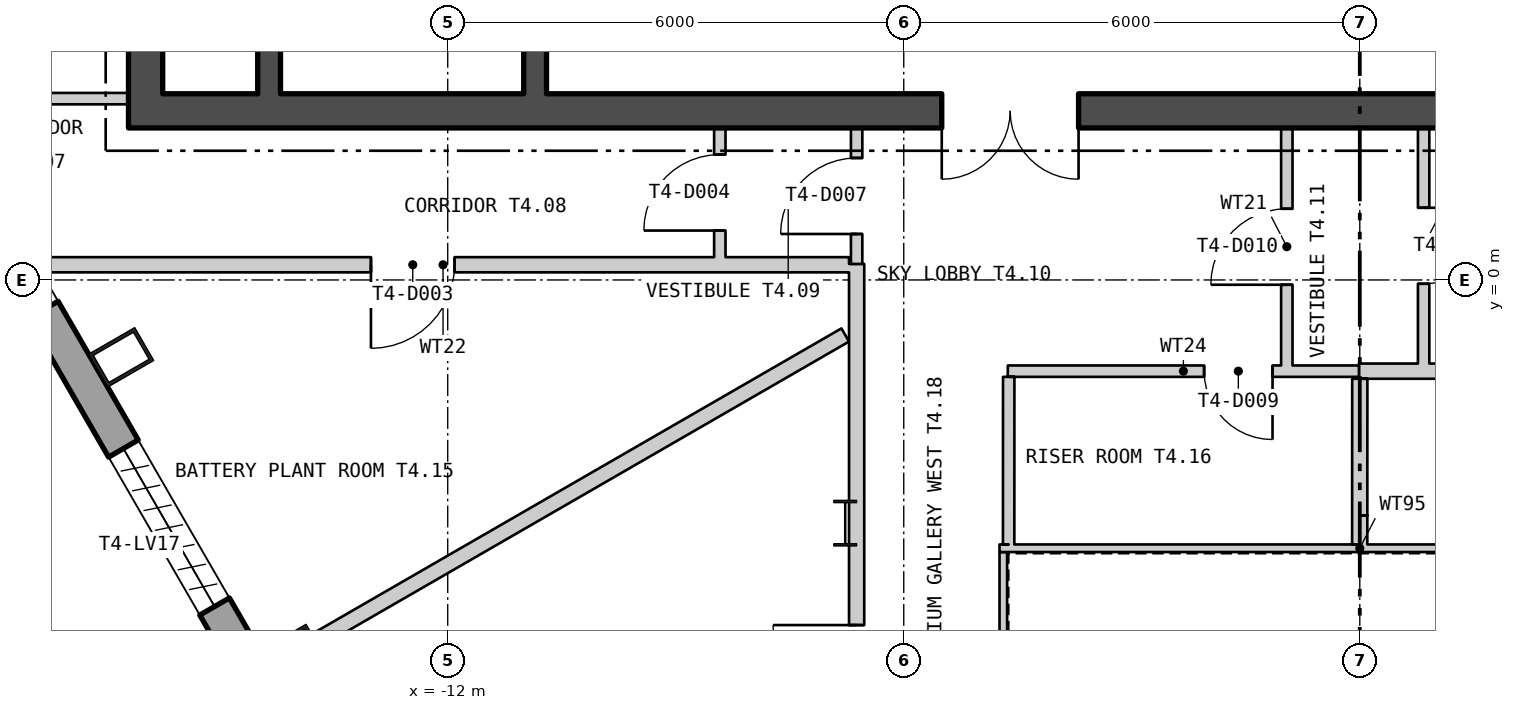
"""IFC4 building model, lengths in metres.
Left out: names, types, materials, properties, quantities, classifications, styles, units other than length and angle.
Written with IfcOpenShell. Run it as: python <this file> out.ifc"""

import sys

from ifc_helpers import new_model, si_unit, direction, frame, frame_2d, origin, origin_2d, place, context, subcontext, project, spatial, polyline, rectangle, hollow_rectangle, i_section, outline, extrude, element, fill, save


model = new_model("IFC4")
c1 = context("Model", 3, precision=1e-05, world=origin(), true_north=direction((0.0, 1.0)))
c2 = subcontext(c1, "Body", "Model", "MODEL_VIEW")
j1 = project(units=[si_unit("LENGTHUNIT", "METRE"), si_unit("PLANEANGLEUNIT", "RADIAN")], contexts=[c1])
p1 = place(None, origin())
s1 = spatial("IfcSite", under=j1, at=p1, CompositionType="ELEMENT")
p2 = place(p1, origin())
s2 = spatial("IfcBuilding", under=s1, at=p2, CompositionType="ELEMENT")
p3 = place(p2, frame((0.0, 0.0, 239.4)))
s3 = spatial("IfcBuildingStorey", under=s2, at=p3, CompositionType="ELEMENT", Elevation=239.4)
for number, where, z_axis, x_axis in (
    (1, (-16.296, -1.018, 0.0), (0.0, 0.0, 1.0), (0.5, -0.866, 0.0)),
    (2, (-14.042, -4.922, 0.0), (0.0, 0.0, 1.0), (0.5, -0.866, 0.0)),
):
    element("IfcColumn", number, at=place(p3, frame(where, z_axis=z_axis, x_axis=x_axis)), inside=s3, PredefinedType="COLUMN", context=c2, shape_type="SweptSolid", body=[
        extrude(hollow_rectangle(XDim=0.5, YDim=0.7, WallThickness=0.045, at=origin_2d()), origin(), (0.0, 0.0, 1.0), 6.0),
    ])
p4 = place(p3, frame((-6.77, -3.2, 0.0), z_axis=(0.0, 0.0, 1.0), x_axis=(1.0, 0.0, 0.0)))
e3 = element("IfcColumn", 3, at=p4, inside=s3, PredefinedType="COLUMN", context=c2, shape_type="SweptSolid", body=[
    extrude(i_section(OverallWidth=0.3, OverallDepth=0.6, WebThickness=0.015, FlangeThickness=0.03, at=origin_2d()), origin(), (0.0, 0.0, 1.0), 6.0),
])
p5 = place(p3, frame((-25.975, 14.597, -0.18), z_axis=(0.0, 0.0, 1.0), x_axis=(0.499999764979, -0.866025539474, 0.0)))
e4 = element("IfcWall", 4, at=p5, inside=s3, PredefinedType="SOLIDWALL", context=c2, shape_type="SweptSolid", body=[
    extrude(outline(polyline([(-0.13, -0.225), (45.87, -0.225), (45.61, 0.225), (0.13, 0.225), (-0.13, -0.225)])), origin(), (0.0, 0.0, 1.0), 6.0),
])
p6 = place(p5, frame((1.424, 0.0, 1.38)))
e5 = element("IfcOpeningElement", 5, at=p6, cuts=e4, PredefinedType="OPENING", context=c2, shape_type="SweptSolid", body=[
    extrude(rectangle(XDim=2.4, YDim=3.6, at=frame_2d((1.2, 1.8))), frame((0.0, 0.235, 0.0), z_axis=(0.0, -1.0, 0.0), x_axis=(1.0, 0.0, 0.0)), (0.0, 0.0, 1.0), 0.47),
])
p7 = place(p5, frame((5.893, 0.0, 1.38)))
e6 = element("IfcOpeningElement", 6, at=p7, cuts=e4, PredefinedType="OPENING", context=c2, shape_type="SweptSolid", body=[
    extrude(rectangle(XDim=2.4, YDim=3.6, at=frame_2d((1.2, 1.8))), frame((0.0, 0.235, 0.0), z_axis=(0.0, -1.0, 0.0), x_axis=(1.0, 0.0, 0.0)), (0.0, 0.0, 1.0), 0.47),
])
p8 = place(p5, frame((10.401, 0.0, 1.38)))
e7 = element("IfcOpeningElement", 7, at=p8, cuts=e4, PredefinedType="OPENING", context=c2, shape_type="SweptSolid", body=[
    extrude(rectangle(XDim=2.4, YDim=3.6, at=frame_2d((1.2, 1.8))), frame((0.0, 0.235, 0.0), z_axis=(0.0, -1.0, 0.0), x_axis=(1.0, 0.0, 0.0)), (0.0, 0.0, 1.0), 0.47),
])
p9 = place(p5, frame((14.909, 0.0, 1.38)))
e8 = element("IfcOpeningElement", 8, at=p9, cuts=e4, PredefinedType="OPENING", context=c2, shape_type="SweptSolid", body=[
    extrude(rectangle(XDim=2.4, YDim=3.6, at=frame_2d((1.2, 1.8))), frame((0.0, 0.235, 0.0), z_axis=(0.0, -1.0, 0.0), x_axis=(1.0, 0.0, 0.0)), (0.0, 0.0, 1.0), 0.47),
])
p10 = place(p5, frame((19.416, 0.0, 1.38)))
e9 = element("IfcOpeningElement", 9, at=p10, cuts=e4, PredefinedType="OPENING", context=c2, shape_type="SweptSolid", body=[
    extrude(rectangle(XDim=2.4, YDim=3.6, at=frame_2d((1.2, 1.8))), frame((0.0, 0.235, 0.0), z_axis=(0.0, -1.0, 0.0), x_axis=(1.0, 0.0, 0.0)), (0.0, 0.0, 1.0), 0.47),
])
p11 = place(p5, frame((23.924, 0.0, 1.38)))
e10 = element("IfcOpeningElement", 10, at=p11, cuts=e4, PredefinedType="OPENING", context=c2, shape_type="SweptSolid", body=[
    extrude(rectangle(XDim=2.4, YDim=3.6, at=frame_2d((1.2, 1.8))), frame((0.0, 0.235, 0.0), z_axis=(0.0, -1.0, 0.0), x_axis=(1.0, 0.0, 0.0)), (0.0, 0.0, 1.0), 0.47),
])
p12 = place(p5, frame((28.431, 0.0, 1.38)))
e11 = element("IfcOpeningElement", 11, at=p12, cuts=e4, PredefinedType="OPENING", context=c2, shape_type="SweptSolid", body=[
    extrude(rectangle(XDim=2.4, YDim=3.6, at=frame_2d((1.2, 1.8))), frame((0.0, 0.235, 0.0), z_axis=(0.0, -1.0, 0.0), x_axis=(1.0, 0.0, 0.0)), (0.0, 0.0, 1.0), 0.47),
])
p13 = place(p5, frame((32.939, 0.0, 1.38)))
e12 = element("IfcOpeningElement", 12, at=p13, cuts=e4, PredefinedType="OPENING", context=c2, shape_type="SweptSolid", body=[
    extrude(rectangle(XDim=2.4, YDim=3.6, at=frame_2d((1.2, 1.8))), frame((0.0, 0.235, 0.0), z_axis=(0.0, -1.0, 0.0), x_axis=(1.0, 0.0, 0.0)), (0.0, 0.0, 1.0), 0.47),
])
p14 = place(p5, frame((37.447, 0.0, 1.38)))
e13 = element("IfcOpeningElement", 13, at=p14, cuts=e4, PredefinedType="OPENING", context=c2, shape_type="SweptSolid", body=[
    extrude(rectangle(XDim=2.4, YDim=3.6, at=frame_2d((1.2, 1.8))), frame((0.0, 0.235, 0.0), z_axis=(0.0, -1.0, 0.0), x_axis=(1.0, 0.0, 0.0)), (0.0, 0.0, 1.0), 0.47),
])
p15 = place(p5, frame((41.916, 0.0, 1.38)))
e14 = element("IfcOpeningElement", 14, at=p15, cuts=e4, PredefinedType="OPENING", context=c2, shape_type="SweptSolid", body=[
    extrude(rectangle(XDim=2.4, YDim=3.6, at=frame_2d((1.2, 1.8))), frame((0.0, 0.235, 0.0), z_axis=(0.0, -1.0, 0.0), x_axis=(1.0, 0.0, 0.0)), (0.0, 0.0, 1.0), 0.47),
])
p16 = place(p3, frame((4.74, -3.53, 0.0), z_axis=(0.0, 0.0, 1.0), x_axis=(-1.0, 0.0, 0.0)))
e15 = element("IfcWall", 15, at=p16, inside=s3, PredefinedType="PARTITIONING", context=c2, shape_type="SweptSolid", body=[
    extrude(rectangle(XDim=9.48, YDim=0.1, at=frame_2d((4.74, 0.0))), origin(), (0.0, 0.0, 1.0), 5.8),
])
p17 = place(p3, frame((-4.69, -3.58, 0.0), z_axis=(0.0, 0.0, 1.0), x_axis=(0.0, -1.0, 0.0)))
e16 = element("IfcWall", 16, at=p17, inside=s3, PredefinedType="PARTITIONING", context=c2, shape_type="SweptSolid", body=[
    extrude(rectangle(XDim=8.04, YDim=0.1, at=frame_2d((4.02, 0.0))), origin(), (0.0, 0.0, 1.0), 5.8),
])
p18 = place(p3, frame((-16.2, 2.225, 0.0), z_axis=(0.0, 0.0, 1.0), x_axis=(1.0, 0.0, 0.0)))
e17 = element("IfcWall", 17, at=p18, inside=s3, PredefinedType="SHEAR", context=c2, shape_type="SweptSolid", body=[
    extrude(rectangle(XDim=32.4, YDim=0.45, at=frame_2d((16.2, 0.0))), origin(), (0.0, 0.0, 1.0), 5.8),
])
p19 = place(p18, frame((10.7, 0.0, 0.0)))
e18 = element("IfcOpeningElement", 18, at=p19, cuts=e17, PredefinedType="OPENING", context=c2, shape_type="SweptSolid", body=[
    extrude(rectangle(XDim=1.8, YDim=2.4, at=frame_2d((0.9, 1.2))), frame((0.0, 0.235, 0.0), z_axis=(0.0, -1.0, 0.0), x_axis=(1.0, 0.0, 0.0)), (0.0, 0.0, 1.0), 0.47),
])
p20 = place(p18, frame((20.7, 0.0, 0.0)))
e19 = element("IfcOpeningElement", 19, at=p20, cuts=e17, PredefinedType="OPENING", context=c2, shape_type="SweptSolid", body=[
    extrude(rectangle(XDim=1.8, YDim=2.4, at=frame_2d((0.9, 1.2))), frame((0.0, 0.235, 0.0), z_axis=(0.0, -1.0, 0.0), x_axis=(1.0, 0.0, 0.0)), (0.0, 0.0, 1.0), 0.47),
])
p21 = place(p3, frame((-15.975, 2.45, 0.0), z_axis=(0.0, 0.0, 1.0), x_axis=(0.0, 1.0, 0.0)))
e20 = element("IfcWall", 20, at=p21, inside=s3, PredefinedType="SHEAR", context=c2, shape_type="SweptSolid", body=[
    extrude(rectangle(XDim=15.1, YDim=0.45, at=frame_2d((7.55, 0.0))), origin(), (0.0, 0.0, 1.0), 5.8),
])
p22 = place(p21, frame((4.4, 0.0, 0.0)))
e21 = element("IfcOpeningElement", 21, at=p22, cuts=e20, PredefinedType="OPENING", context=c2, shape_type="SweptSolid", body=[
    extrude(rectangle(XDim=1.5, YDim=2.1, at=frame_2d((0.75, 1.05))), frame((0.0, 0.235, 0.0), z_axis=(0.0, -1.0, 0.0), x_axis=(1.0, 0.0, 0.0)), (0.0, 0.0, 1.0), 0.47),
])
p23 = place(p21, frame((1.086, 0.0, 0.0)))
e22 = element("IfcOpeningElement", 22, at=p23, cuts=e20, PredefinedType="OPENING", context=c2, shape_type="SweptSolid", body=[
    extrude(rectangle(XDim=0.9, YDim=2.1, at=frame_2d((0.45, 1.05))), frame((0.0, 0.235, 0.0), z_axis=(0.0, -1.0, 0.0), x_axis=(1.0, 0.0, 0.0)), (0.0, 0.0, 1.0), 0.47),
])
p24 = place(p21, frame((3.05, 0.0, 0.0)))
e23 = element("IfcOpeningElement", 23, at=p24, cuts=e20, PredefinedType="OPENING", context=c2, shape_type="SweptSolid", body=[
    extrude(rectangle(XDim=0.9, YDim=2.1, at=frame_2d((0.45, 1.05))), frame((0.0, 0.235, 0.0), z_axis=(0.0, -1.0, 0.0), x_axis=(1.0, 0.0, 0.0)), (0.0, 0.0, 1.0), 0.47),
])
p25 = place(p21, frame((7.055, 0.0, 0.0)))
e24 = element("IfcOpeningElement", 24, at=p25, cuts=e20, PredefinedType="OPENING", context=c2, shape_type="SweptSolid", body=[
    extrude(rectangle(XDim=1.0, YDim=2.1, at=frame_2d((0.5, 1.05))), frame((0.0, 0.235, 0.0), z_axis=(0.0, -1.0, 0.0), x_axis=(1.0, 0.0, 0.0)), (0.0, 0.0, 1.0), 0.47),
])
p26 = place(p21, frame((11.705, 0.0, 0.0)))
e25 = element("IfcOpeningElement", 25, at=p26, cuts=e20, PredefinedType="OPENING", context=c2, shape_type="SweptSolid", body=[
    extrude(rectangle(XDim=0.9, YDim=2.1, at=frame_2d((0.45, 1.05))), frame((0.0, 0.235, 0.0), z_axis=(0.0, -1.0, 0.0), x_axis=(1.0, 0.0, 0.0)), (0.0, 0.0, 1.0), 0.47),
])
p27 = place(p3, frame((-10.85, 2.45, 0.0), z_axis=(0.0, 0.0, 1.0), x_axis=(0.0, 1.0, 0.0)))
e26 = element("IfcWall", 26, at=p27, inside=s3, PredefinedType="SHEAR", context=c2, shape_type="SweptSolid", body=[
    extrude(rectangle(XDim=15.1, YDim=0.3, at=frame_2d((7.55, 0.0))), origin(), (0.0, 0.0, 1.0), 5.8),
])
p28 = place(p27, frame((3.525, 0.0, 0.0)))
e27 = element("IfcOpeningElement", 27, at=p28, cuts=e26, PredefinedType="OPENING", context=c2, shape_type="SweptSolid", body=[
    extrude(rectangle(XDim=1.25, YDim=2.1, at=frame_2d((0.625, 1.05))), frame((0.0, 0.16, 0.0), z_axis=(0.0, -1.0, 0.0), x_axis=(1.0, 0.0, 0.0)), (0.0, 0.0, 1.0), 0.32),
])
p29 = place(p27, frame((1.15, 0.0, 0.0)))
e28 = element("IfcOpeningElement", 28, at=p29, cuts=e26, PredefinedType="OPENING", context=c2, shape_type="SweptSolid", body=[
    extrude(rectangle(XDim=1.0, YDim=2.1, at=frame_2d((0.5, 1.05))), frame((0.0, 0.16, 0.0), z_axis=(0.0, -1.0, 0.0), x_axis=(1.0, 0.0, 0.0)), (0.0, 0.0, 1.0), 0.32),
])
p30 = place(p3, frame((-14.35, 2.45, 0.0), z_axis=(0.0, 0.0, 1.0), x_axis=(0.0, 1.0, 0.0)))
e29 = element("IfcWall", 29, at=p30, inside=s3, PredefinedType="SHEAR", context=c2, shape_type="SweptSolid", body=[
    extrude(rectangle(XDim=15.1, YDim=0.3, at=frame_2d((7.55, 0.0))), origin(), (0.0, 0.0, 1.0), 5.8),
])
p31 = place(p30, frame((4.4, 0.0, 0.0)))
e30 = element("IfcOpeningElement", 30, at=p31, cuts=e29, PredefinedType="OPENING", context=c2, shape_type="SweptSolid", body=[
    extrude(rectangle(XDim=1.5, YDim=2.1, at=frame_2d((0.75, 1.05))), frame((0.0, 0.16, 0.0), z_axis=(0.0, -1.0, 0.0), x_axis=(1.0, 0.0, 0.0)), (0.0, 0.0, 1.0), 0.32),
])
p32 = place(p3, frame((-17.857, 2.386, 0.0), z_axis=(0.0, 0.0, 1.0), x_axis=(1.0, 0.0, 0.0)))
e31 = element("IfcWall", 31, at=p32, inside=s3, PredefinedType="PARTITIONING", context=c2, shape_type="SweptSolid", body=[
    extrude(rectangle(XDim=1.657, YDim=0.15, at=frame_2d((0.829, 0.0))), origin(), (0.0, 0.0, 1.0), 5.8),
])
p33 = place(p3, frame((-17.403, 0.2, 0.0), z_axis=(0.0, 0.0, 1.0), x_axis=(1.0, 0.0, 0.0)))
e32 = element("IfcWall", 32, at=p33, inside=s3, PredefinedType="PARTITIONING", context=c2, shape_type="SweptSolid", body=[
    extrude(rectangle(XDim=10.683, YDim=0.2, at=frame_2d((5.341, 0.0))), origin(), (0.0, 0.0, 1.0), 5.8),
])
p34 = place(p33, frame((4.393, 0.0, 0.0)))
e33 = element("IfcOpeningElement", 33, at=p34, cuts=e32, PredefinedType="OPENING", context=c2, shape_type="SweptSolid", body=[
    extrude(rectangle(XDim=1.1, YDim=2.1, at=frame_2d((0.55, 1.05))), frame((0.0, 0.11, 0.0), z_axis=(0.0, -1.0, 0.0), x_axis=(1.0, 0.0, 0.0)), (0.0, 0.0, 1.0), 0.22),
])
p35 = place(p3, frame((-13.956, -4.872, 0.0), z_axis=(0.0, 0.0, 1.0), x_axis=(0.866069187523, 0.499924156672, 0.0)))
e34 = element("IfcWall", 34, at=p35, inside=s3, PredefinedType="PARTITIONING", context=c2, shape_type="SweptSolid", body=[
    extrude(rectangle(XDim=8.297, YDim=0.2, at=frame_2d((4.149, 0.0))), origin(), (0.0, 0.0, 1.0), 5.8),
])
p36 = place(p3, frame((-8.42, 0.3, 0.0), z_axis=(0.0, 0.0, 1.0), x_axis=(0.0, 1.0, 0.0)))
e35 = element("IfcWall", 35, at=p36, inside=s3, PredefinedType="PARTITIONING", context=c2, shape_type="SweptSolid", body=[
    extrude(rectangle(XDim=1.7, YDim=0.15, at=frame_2d((0.85, 0.0))), origin(), (0.0, 0.0, 1.0), 5.8),
])
p37 = place(p36, frame((0.35, 0.0, 0.0)))
e36 = element("IfcOpeningElement", 36, at=p37, cuts=e35, PredefinedType="OPENING", context=c2, shape_type="SweptSolid", body=[
    extrude(rectangle(XDim=1.0, YDim=2.1, at=frame_2d((0.5, 1.05))), frame((0.0, 0.085, 0.0), z_axis=(0.0, -1.0, 0.0), x_axis=(1.0, 0.0, 0.0)), (0.0, 0.0, 1.0), 0.17),
])
p38 = place(p3, frame((-6.62, -13.7, 0.0), z_axis=(0.0, 0.0, 1.0), x_axis=(0.0, 1.0, 0.0)))
e37 = element("IfcWall", 37, at=p38, inside=s3, PredefinedType="PARTITIONING", context=c2, shape_type="SweptSolid", body=[
    extrude(rectangle(XDim=10.5, YDim=0.2, at=frame_2d((5.25, 0.0))), origin(), (0.0, 0.0, 1.0), 5.21),
])
p39 = place(p38, frame((4.656, 0.0, 0.0)))
e38 = element("IfcOpeningElement", 38, at=p39, cuts=e37, PredefinedType="OPENING", context=c2, shape_type="SweptSolid", body=[
    extrude(rectangle(XDim=1.1, YDim=2.1, at=frame_2d((0.55, 1.05))), frame((0.0, 0.11, 0.0), z_axis=(0.0, -1.0, 0.0), x_axis=(1.0, 0.0, 0.0)), (0.0, 0.0, 1.0), 0.22),
])
p40 = place(p38, frame((8.059, 0.0, 0.0)))
e39 = element("IfcOpeningElement", 39, at=p40, cuts=e37, PredefinedType="OPENING", context=c2, shape_type="SweptSolid", body=[
    extrude(rectangle(XDim=1.1, YDim=2.1, at=frame_2d((0.55, 1.05))), frame((0.0, 0.11, 0.0), z_axis=(0.0, -1.0, 0.0), x_axis=(1.0, 0.0, 0.0)), (0.0, 0.0, 1.0), 0.22),
])
p41 = place(p3, frame((-6.62, -3.2, 0.0), z_axis=(0.0, 0.0, 1.0), x_axis=(0.0, 1.0, 0.0)))
e40 = element("IfcWall", 40, at=p41, inside=s3, PredefinedType="PARTITIONING", context=c2, shape_type="SweptSolid", body=[
    extrude(rectangle(XDim=3.411, YDim=0.2, at=frame_2d((1.706, 0.0))), origin(), (0.0, 0.0, 1.0), 5.8),
])
p42 = place(p3, frame((-6.62, 0.211, 0.0), z_axis=(0.0, 0.0, 1.0), x_axis=(0.0, 1.0, 0.0)))
e41 = element("IfcWall", 41, at=p42, inside=s3, PredefinedType="PARTITIONING", context=c2, shape_type="SweptSolid", body=[
    extrude(rectangle(XDim=1.789, YDim=0.15, at=frame_2d((0.894, 0.0))), origin(), (0.0, 0.0, 1.0), 5.8),
])
p43 = place(p42, frame((0.394, 0.0, 0.0)))
e42 = element("IfcOpeningElement", 42, at=p43, cuts=e41, PredefinedType="OPENING", context=c2, shape_type="SweptSolid", body=[
    extrude(rectangle(XDim=1.0, YDim=2.1, at=frame_2d((0.5, 1.05))), frame((0.0, 0.085, 0.0), z_axis=(0.0, -1.0, 0.0), x_axis=(1.0, 0.0, 0.0)), (0.0, 0.0, 1.0), 0.17),
])
p44 = place(p3, frame((-4.631, -1.2, 0.0), z_axis=(0.0, 0.0, 1.0), x_axis=(1.0, 0.0, 0.0)))
e43 = element("IfcWall", 43, at=p44, inside=s3, PredefinedType="PARTITIONING", context=c2, shape_type="SweptSolid", body=[
    extrude(rectangle(XDim=4.62, YDim=0.15, at=frame_2d((2.31, 0.0))), origin(), (0.0, 0.0, 1.0), 5.8),
])
p45 = place(p44, frame((2.583, 0.0, 0.0)))
e44 = element("IfcOpeningElement", 44, at=p45, cuts=e43, PredefinedType="OPENING", context=c2, shape_type="SweptSolid", body=[
    extrude(rectangle(XDim=0.9, YDim=2.1, at=frame_2d((0.45, 1.05))), frame((0.0, 0.085, 0.0), z_axis=(0.0, -1.0, 0.0), x_axis=(1.0, 0.0, 0.0)), (0.0, 0.0, 1.0), 0.17),
])
p46 = place(p3, frame((-4.62, -3.48, 0.0), z_axis=(0.0, 0.0, 1.0), x_axis=(0.000453514693, 0.999999897162, 0.0)))
e45 = element("IfcWall", 45, at=p46, inside=s3, PredefinedType="PARTITIONING", context=c2, shape_type="SweptSolid", body=[
    extrude(rectangle(XDim=2.205, YDim=0.15, at=frame_2d((1.103, 0.0))), origin(), (0.0, 0.0, 1.0), 5.8),
])
p47 = place(p3, frame((-0.96, -1.125, 0.0), z_axis=(0.0, 0.0, 1.0), x_axis=(0.0, 1.0, 0.0)))
e46 = element("IfcWall", 46, at=p47, inside=s3, PredefinedType="PARTITIONING", context=c2, shape_type="SweptSolid", body=[
    extrude(rectangle(XDim=3.125, YDim=0.15, at=frame_2d((1.562, 0.0))), origin(), (0.0, 0.0, 1.0), 5.8),
])
p48 = place(p47, frame((1.062, 0.0, 0.0)))
e47 = element("IfcOpeningElement", 47, at=p48, cuts=e46, PredefinedType="OPENING", context=c2, shape_type="SweptSolid", body=[
    extrude(rectangle(XDim=1.0, YDim=2.1, at=frame_2d((0.5, 1.05))), frame((0.0, 0.085, 0.0), z_axis=(0.0, -1.0, 0.0), x_axis=(1.0, 0.0, 0.0)), (0.0, 0.0, 1.0), 0.17),
])
p49 = place(p3, frame((-0.011, -1.2, 0.0), z_axis=(0.0, 0.0, 1.0), x_axis=(1.0, 0.0, 0.0)))
e48 = element("IfcWall", 48, at=p49, inside=s3, PredefinedType="PARTITIONING", context=c2, shape_type="SweptSolid", body=[
    extrude(rectangle(XDim=6.731, YDim=0.2, at=frame_2d((3.365, 0.0))), origin(), (0.0, 0.0, 1.0), 5.8),
])
p50 = place(p3, frame((-0.001, -3.48, 0.0), z_axis=(0.0, 0.0, 1.0), x_axis=(0.000526315717, 0.999999861496, 0.0)))
e49 = element("IfcWall", 49, at=p50, inside=s3, PredefinedType="PARTITIONING", context=c2, shape_type="SweptSolid", body=[
    extrude(rectangle(XDim=0.38, YDim=0.2, at=frame_2d((0.19, 0.0))), origin(), (0.0, 0.0, 1.0), 5.8),
])
p51 = place(p3, frame((-0.001, -3.1, 0.0), z_axis=(0.0, 0.0, 1.0), x_axis=(0.000444444401, 0.999999901235, 0.0)))
e50 = element("IfcWall", 50, at=p51, inside=s3, PredefinedType="PARTITIONING", context=c2, shape_type="SweptSolid", body=[
    extrude(rectangle(XDim=1.8, YDim=0.2, at=frame_2d((0.9, 0.0))), origin(), (0.0, 0.0, 1.0), 5.3),
])
p52 = place(p3, frame((0.84, -1.1, 0.0), z_axis=(0.0, 0.0, 1.0), x_axis=(0.0, 1.0, 0.0)))
e51 = element("IfcWall", 51, at=p52, inside=s3, PredefinedType="PARTITIONING", context=c2, shape_type="SweptSolid", body=[
    extrude(rectangle(XDim=3.1, YDim=0.15, at=frame_2d((1.55, 0.0))), origin(), (0.0, 0.0, 1.0), 5.8),
])
p53 = place(p52, frame((1.05, 0.0, 0.0)))
e52 = element("IfcOpeningElement", 52, at=p53, cuts=e51, PredefinedType="OPENING", context=c2, shape_type="SweptSolid", body=[
    extrude(rectangle(XDim=1.0, YDim=2.1, at=frame_2d((0.5, 1.05))), frame((0.0, 0.085, 0.0), z_axis=(0.0, -1.0, 0.0), x_axis=(1.0, 0.0, 0.0)), (0.0, 0.0, 1.0), 0.17),
])
p54 = place(p19, origin())
e53 = element("IfcDoor", 53, at=p54, inside=s3, OperationType="DOUBLE_DOOR_SINGLE_SWING", PredefinedType="DOOR", context=c2, shape_type="SweptSolid", body=[
    extrude(rectangle(XDim=1.8, YDim=2.4, at=frame_2d((0.9, 1.2))), frame((0.0, 0.025, 0.0), z_axis=(0.0, -1.0, 0.0), x_axis=(1.0, 0.0, 0.0)), (0.0, 0.0, 1.0), 0.05),
])
fill(e18, e53)
p55 = place(p34, origin())
e54 = element("IfcDoor", 54, at=p55, inside=s3, OperationType="SINGLE_SWING_LEFT", PredefinedType="DOOR", context=c2, shape_type="SweptSolid", body=[
    extrude(rectangle(XDim=1.1, YDim=2.1, at=frame_2d((0.55, 1.05))), frame((0.0, 0.025, 0.0), z_axis=(0.0, -1.0, 0.0), x_axis=(1.0, 0.0, 0.0)), (0.0, 0.0, 1.0), 0.05),
])
fill(e33, e54)
p56 = place(p37, origin())
e55 = element("IfcDoor", 55, at=p56, inside=s3, OperationType="SINGLE_SWING_RIGHT", PredefinedType="DOOR", context=c2, shape_type="SweptSolid", body=[
    extrude(rectangle(XDim=1.0, YDim=2.1, at=frame_2d((0.5, 1.05))), frame((0.0, 0.025, 0.0), z_axis=(0.0, -1.0, 0.0), x_axis=(1.0, 0.0, 0.0)), (0.0, 0.0, 1.0), 0.05),
])
fill(e36, e55)
p57 = place(p40, origin())
e56 = element("IfcDoor", 56, at=p57, inside=s3, OperationType="SINGLE_SWING_LEFT", PredefinedType="DOOR", context=c2, shape_type="SweptSolid", body=[
    extrude(rectangle(XDim=1.1, YDim=2.1, at=frame_2d((0.55, 1.05))), frame((0.0, 0.025, 0.0), z_axis=(0.0, -1.0, 0.0), x_axis=(1.0, 0.0, 0.0)), (0.0, 0.0, 1.0), 0.05),
])
fill(e39, e56)
p58 = place(p43, origin())
e57 = element("IfcDoor", 57, at=p58, inside=s3, OperationType="SINGLE_SWING_RIGHT", PredefinedType="DOOR", context=c2, shape_type="SweptSolid", body=[
    extrude(rectangle(XDim=1.0, YDim=2.1, at=frame_2d((0.5, 1.05))), frame((0.0, 0.025, 0.0), z_axis=(0.0, -1.0, 0.0), x_axis=(1.0, 0.0, 0.0)), (0.0, 0.0, 1.0), 0.05),
])
fill(e42, e57)
p59 = place(p45, origin())
e58 = element("IfcDoor", 58, at=p59, inside=s3, OperationType="SINGLE_SWING_RIGHT", PredefinedType="DOOR", context=c2, shape_type="SweptSolid", body=[
    extrude(rectangle(XDim=0.9, YDim=2.1, at=frame_2d((0.45, 1.05))), frame((0.0, 0.025, 0.0), z_axis=(0.0, -1.0, 0.0), x_axis=(1.0, 0.0, 0.0)), (0.0, 0.0, 1.0), 0.05),
])
fill(e44, e58)
p60 = place(p48, origin())
e59 = element("IfcDoor", 59, at=p60, inside=s3, OperationType="SINGLE_SWING_RIGHT", PredefinedType="DOOR", context=c2, shape_type="SweptSolid", body=[
    extrude(rectangle(XDim=1.0, YDim=2.1, at=frame_2d((0.5, 1.05))), frame((0.0, 0.025, 0.0), z_axis=(0.0, -1.0, 0.0), x_axis=(1.0, 0.0, 0.0)), (0.0, 0.0, 1.0), 0.05),
])
fill(e47, e59)
p61 = place(p53, origin())
e60 = element("IfcDoor", 60, at=p61, inside=s3, OperationType="SINGLE_SWING_RIGHT", PredefinedType="DOOR", context=c2, shape_type="SweptSolid", body=[
    extrude(rectangle(XDim=1.0, YDim=2.1, at=frame_2d((0.5, 1.05))), frame((0.0, 0.025, 0.0), z_axis=(0.0, -1.0, 0.0), x_axis=(1.0, 0.0, 0.0)), (0.0, 0.0, 1.0), 0.05),
])
fill(e52, e60)
save(model, sys.argv[1])
